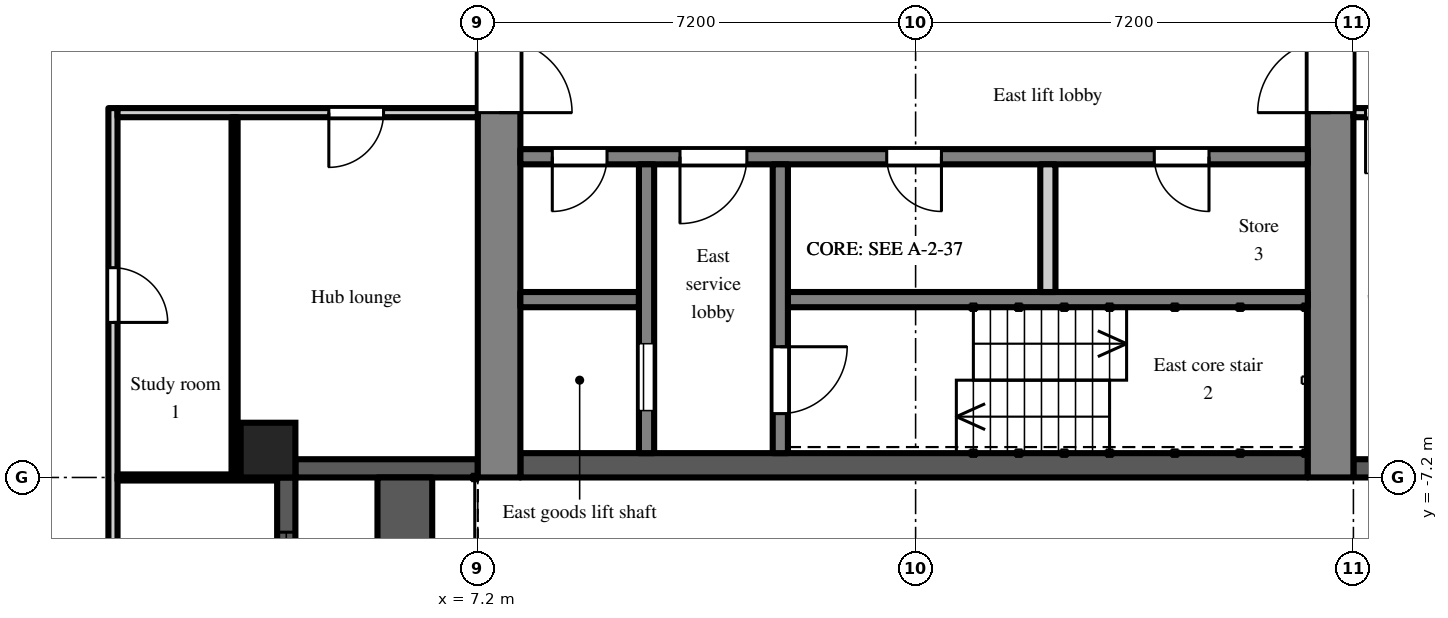
"""IFC4 building model, lengths in metres.
Left out: names, types, materials, properties, quantities, classifications, styles, units other than length and angle.
Written with IfcOpenShell. Run it as: python <this file> out.ifc"""

import sys

from ifc_helpers import new_model, si_unit, direction, frame, frame_2d, origin, origin_2d, place, context, subcontext, project, spatial, rectangle, extrude, element, fill, save


model = new_model("IFC4")
c1 = context("Model", 3, precision=1e-05, world=origin(), true_north=direction((0.0, 1.0)))
c2 = subcontext(c1, "Body", "Model", "MODEL_VIEW")
j1 = project(units=[si_unit("LENGTHUNIT", "METRE"), si_unit("PLANEANGLEUNIT", "RADIAN")], contexts=[c1])
p1 = place(None, origin())
s1 = spatial("IfcSite", under=j1, at=p1, CompositionType="ELEMENT")
p2 = place(p1, origin())
s2 = spatial("IfcBuilding", under=s1, at=p2, CompositionType="ELEMENT")
p3 = place(p2, frame((0.0, 0.0, 225.9)))
s3 = spatial("IfcBuildingStorey", under=s2, at=p3, CompositionType="ELEMENT", Elevation=225.9)
p4 = place(p3, frame((3.75, -6.75, 0.0), z_axis=(0.0, 0.0, 1.0), x_axis=(1.0, 0.0, 0.0)))
e1 = element("IfcColumn", 1, at=p4, inside=s3, PredefinedType="COLUMN", context=c2, shape_type="SweptSolid", body=[
    extrude(rectangle(XDim=0.9, YDim=0.9, at=origin_2d()), origin(), (0.0, 0.0, 1.0), 3.0),
])
p5 = place(p3, frame((21.6, -7.05, 0.0), z_axis=(0.0, 0.0, 1.0), x_axis=(1.0, 0.0, 0.0)))
e2 = element("IfcWall", 2, at=p5, inside=s3, PredefinedType="SOLIDWALL", context=c2, shape_type="SweptSolid", body=[
    extrude(rectangle(XDim=2.7, YDim=0.3, at=frame_2d((1.35, 0.0))), origin(), (0.0, 0.0, 1.0), 2.3),
])
p6 = place(p5, frame((0.75, 0.0, 0.2)))
e3 = element("IfcOpeningElement", 3, at=p6, cuts=e2, PredefinedType="OPENING", context=c2, shape_type="SweptSolid", body=[
    extrude(rectangle(XDim=1.2, YDim=1.85, at=frame_2d((0.6, 0.925))), frame((0.0, 0.16, 0.0), z_axis=(0.0, -1.0, 0.0), x_axis=(1.0, 0.0, 0.0)), (0.0, 0.0, 1.0), 0.32),
])
p7 = place(p3, frame((4.05, -14.4, 0.0), z_axis=(0.0, 0.0, 1.0), x_axis=(0.0, 1.0, 0.0)))
e4 = element("IfcWall", 4, at=p7, inside=s3, PredefinedType="SOLIDWALL", context=c2, shape_type="SweptSolid", body=[
    extrude(rectangle(XDim=7.2, YDim=0.3, at=frame_2d((3.6, 0.0))), origin(), (0.0, 0.0, 1.0), 2.3),
])
p8 = place(p7, frame((3.0, 0.0, 0.0)))
e5 = element("IfcOpeningElement", 5, at=p8, cuts=e4, PredefinedType="OPENING", context=c2, shape_type="SweptSolid", body=[
    extrude(rectangle(XDim=1.2, YDim=2.05, at=frame_2d((0.6, 1.025))), frame((0.0, 0.16, 0.0), z_axis=(0.0, -1.0, 0.0), x_axis=(1.0, 0.0, 0.0)), (0.0, 0.0, 1.0), 0.32),
])
p9 = place(p7, frame((0.9, 0.0, 0.2)))
e6 = element("IfcOpeningElement", 6, at=p9, cuts=e4, PredefinedType="OPENING", context=c2, shape_type="SweptSolid", body=[
    extrude(rectangle(XDim=1.8, YDim=1.85, at=frame_2d((0.9, 0.925))), frame((0.0, 0.16, 0.0), z_axis=(0.0, -1.0, 0.0), x_axis=(1.0, 0.0, 0.0)), (0.0, 0.0, 1.0), 0.32),
])
p10 = place(p7, frame((4.5, 0.0, 0.2)))
e7 = element("IfcOpeningElement", 7, at=p10, cuts=e4, PredefinedType="OPENING", context=c2, shape_type="SweptSolid", body=[
    extrude(rectangle(XDim=1.8, YDim=1.85, at=frame_2d((0.9, 0.925))), frame((0.0, 0.16, 0.0), z_axis=(0.0, -1.0, 0.0), x_axis=(1.0, 0.0, 0.0)), (0.0, 0.0, 1.0), 0.32),
])
p11 = place(p3, frame((4.2, -7.05, 0.0), z_axis=(0.0, 0.0, 1.0), x_axis=(1.0, 0.0, 0.0)))
e8 = element("IfcWall", 8, at=p11, inside=s3, PredefinedType="SOLIDWALL", context=c2, shape_type="SweptSolid", body=[
    extrude(rectangle(XDim=3.0, YDim=0.3, at=frame_2d((1.5, 0.0))), origin(), (0.0, 0.0, 1.0), 2.3),
])
p12 = place(p3, frame((6.0, -14.4, 0.0), z_axis=(0.0, 0.0, 1.0), x_axis=(0.0, 1.0, 0.0)))
e9 = element("IfcWall", 9, at=p12, inside=s3, PredefinedType="PARAPET", context=c2, shape_type="SweptSolid", body=[
    extrude(rectangle(XDim=7.2, YDim=0.9, at=frame_2d((3.6, 0.0))), origin(), (0.0, 0.0, 1.0), 0.8),
])
p13 = place(p3, frame((7.55, -7.2, 0.0), z_axis=(0.0, 0.0, 1.0), x_axis=(0.0, 1.0, 0.0)))
e10 = element("IfcWall", 10, at=p13, inside=s3, PredefinedType="SHEAR", context=c2, shape_type="SweptSolid", body=[
    extrude(rectangle(XDim=14.4, YDim=0.7, at=frame_2d((7.2, 0.0))), origin(), (0.0, 0.0, 1.0), 2.6),
])
p14 = place(p13, frame((6.0, 0.0, 0.0)))
e11 = element("IfcOpeningElement", 11, at=p14, cuts=e10, PredefinedType="OPENING", context=c2, shape_type="SweptSolid", body=[
    extrude(rectangle(XDim=2.4, YDim=2.2, at=frame_2d((1.2, 1.1))), frame((0.0, 0.36, 0.0), z_axis=(0.0, -1.0, 0.0), x_axis=(1.0, 0.0, 0.0)), (0.0, 0.0, 1.0), 0.72),
])
p15 = place(p3, frame((21.225, -7.2, 0.0), z_axis=(0.0, 0.0, 1.0), x_axis=(0.0, 1.0, 0.0)))
e12 = element("IfcWall", 12, at=p15, inside=s3, PredefinedType="SHEAR", context=c2, shape_type="SweptSolid", body=[
    extrude(rectangle(XDim=14.4, YDim=0.75, at=frame_2d((7.2, 0.0))), origin(), (0.0, 0.0, 1.0), 2.6),
])
p16 = place(p15, frame((6.0, 0.0, 0.0)))
e13 = element("IfcOpeningElement", 13, at=p16, cuts=e12, PredefinedType="OPENING", context=c2, shape_type="SweptSolid", body=[
    extrude(rectangle(XDim=2.4, YDim=2.2, at=frame_2d((1.2, 1.1))), frame((0.0, 0.385, 0.0), z_axis=(0.0, -1.0, 0.0), x_axis=(1.0, 0.0, 0.0)), (0.0, 0.0, 1.0), 0.77),
])
p17 = place(p3, frame((7.9, -7.0, 0.0), z_axis=(0.0, 0.0, 1.0), x_axis=(1.0, 0.0, 0.0)))
e14 = element("IfcWall", 14, at=p17, inside=s3, PredefinedType="SHEAR", context=c2, shape_type="SweptSolid", body=[
    extrude(rectangle(XDim=12.95, YDim=0.4, at=frame_2d((6.475, 0.0))), origin(), (0.0, 0.0, 1.0), 2.6),
])
p18 = place(p3, frame((7.9, -1.925, 0.0), z_axis=(0.0, 0.0, 1.0), x_axis=(1.0, 0.0, 0.0)))
e15 = element("IfcWall", 15, at=p18, inside=s3, PredefinedType="SHEAR", context=c2, shape_type="SweptSolid", body=[
    extrude(rectangle(XDim=12.95, YDim=0.25, at=frame_2d((6.475, 0.0))), origin(), (0.0, 0.0, 1.0), 2.6),
])
p19 = place(p18, frame((0.525, 0.0, 0.0)))
e16 = element("IfcOpeningElement", 16, at=p19, cuts=e15, PredefinedType="OPENING", context=c2, shape_type="SweptSolid", body=[
    extrude(rectangle(XDim=0.9, YDim=2.1, at=frame_2d((0.45, 1.05))), frame((0.0, 0.135, 0.0), z_axis=(0.0, -1.0, 0.0), x_axis=(1.0, 0.0, 0.0)), (0.0, 0.0, 1.0), 0.27),
])
p20 = place(p18, frame((2.625, 0.0, 0.0)))
e17 = element("IfcOpeningElement", 17, at=p20, cuts=e15, PredefinedType="OPENING", context=c2, shape_type="SweptSolid", body=[
    extrude(rectangle(XDim=1.1, YDim=2.1, at=frame_2d((0.55, 1.05))), frame((0.0, 0.135, 0.0), z_axis=(0.0, -1.0, 0.0), x_axis=(1.0, 0.0, 0.0)), (0.0, 0.0, 1.0), 0.27),
])
p21 = place(p18, frame((6.025, 0.0, 0.0)))
e18 = element("IfcOpeningElement", 18, at=p21, cuts=e15, PredefinedType="OPENING", context=c2, shape_type="SweptSolid", body=[
    extrude(rectangle(XDim=0.9, YDim=2.1, at=frame_2d((0.45, 1.05))), frame((0.0, 0.135, 0.0), z_axis=(0.0, -1.0, 0.0), x_axis=(1.0, 0.0, 0.0)), (0.0, 0.0, 1.0), 0.27),
])
p22 = place(p18, frame((10.425, 0.0, 0.0)))
e19 = element("IfcOpeningElement", 19, at=p22, cuts=e15, PredefinedType="OPENING", context=c2, shape_type="SweptSolid", body=[
    extrude(rectangle(XDim=0.9, YDim=2.1, at=frame_2d((0.45, 1.05))), frame((0.0, 0.135, 0.0), z_axis=(0.0, -1.0, 0.0), x_axis=(1.0, 0.0, 0.0)), (0.0, 0.0, 1.0), 0.27),
])
p23 = place(p3, frame((7.9, -4.275, 0.0), z_axis=(0.0, 0.0, 1.0), x_axis=(1.0, 0.0, 0.0)))
e20 = element("IfcWall", 20, at=p23, inside=s3, PredefinedType="SHEAR", context=c2, shape_type="SweptSolid", body=[
    extrude(rectangle(XDim=1.95, YDim=0.25, at=frame_2d((0.975, 0.0))), origin(), (0.0, 0.0, 1.0), 2.6),
])
p24 = place(p3, frame((12.3, -4.275, 0.0), z_axis=(0.0, 0.0, 1.0), x_axis=(1.0, 0.0, 0.0)))
e21 = element("IfcWall", 21, at=p24, inside=s3, PredefinedType="SHEAR", context=c2, shape_type="SweptSolid", body=[
    extrude(rectangle(XDim=8.55, YDim=0.25, at=frame_2d((4.275, 0.0))), origin(), (0.0, 0.0, 1.0), 2.6),
])
p25 = place(p3, frame((9.975, -2.05, 0.0), z_axis=(0.0, 0.0, 1.0), x_axis=(0.0, -1.0, 0.0)))
e22 = element("IfcWall", 22, at=p25, inside=s3, PredefinedType="SHEAR", context=c2, shape_type="SweptSolid", body=[
    extrude(rectangle(XDim=4.75, YDim=0.25, at=frame_2d((2.375, 0.0))), origin(), (0.0, 0.0, 1.0), 2.6),
])
p26 = place(p25, frame((2.95, 0.0, 0.0)))
e23 = element("IfcOpeningElement", 23, at=p26, cuts=e22, PredefinedType="OPENING", context=c2, shape_type="SweptSolid", body=[
    extrude(rectangle(XDim=1.1, YDim=2.1, at=frame_2d((0.55, 1.05))), frame((0.0, 0.135, 0.0), z_axis=(0.0, -1.0, 0.0), x_axis=(1.0, 0.0, 0.0)), (0.0, 0.0, 1.0), 0.27),
])
p27 = place(p3, frame((12.175, -2.05, 0.0), z_axis=(0.0, 0.0, 1.0), x_axis=(0.0, -1.0, 0.0)))
e24 = element("IfcWall", 24, at=p27, inside=s3, PredefinedType="SHEAR", context=c2, shape_type="SweptSolid", body=[
    extrude(rectangle(XDim=4.75, YDim=0.25, at=frame_2d((2.375, 0.0))), origin(), (0.0, 0.0, 1.0), 2.6),
])
p28 = place(p27, frame((3.0, 0.0, 0.0)))
e25 = element("IfcOpeningElement", 25, at=p28, cuts=e24, PredefinedType="OPENING", context=c2, shape_type="SweptSolid", body=[
    extrude(rectangle(XDim=1.1, YDim=2.1, at=frame_2d((0.55, 1.05))), frame((0.0, 0.135, 0.0), z_axis=(0.0, -1.0, 0.0), x_axis=(1.0, 0.0, 0.0)), (0.0, 0.0, 1.0), 0.27),
])
p29 = place(p3, frame((16.575, -2.05, 0.0), z_axis=(0.0, 0.0, 1.0), x_axis=(0.0, -1.0, 0.0)))
e26 = element("IfcWall", 26, at=p29, inside=s3, PredefinedType="PARTITIONING", context=c2, shape_type="SweptSolid", body=[
    extrude(rectangle(XDim=2.1, YDim=0.25, at=frame_2d((1.05, 0.0))), origin(), (0.0, 0.0, 1.0), 2.6),
])
p30 = place(p3, frame((1.2, -19.525, 0.0), z_axis=(0.0, 0.0, 1.0), x_axis=(0.0, 1.0, 0.0)))
e27 = element("IfcWall", 27, at=p30, inside=s3, PredefinedType="PARTITIONING", context=c2, shape_type="SweptSolid", body=[
    extrude(rectangle(XDim=18.4, YDim=0.15, at=frame_2d((9.2, 0.0))), origin(), (0.0, 0.0, 1.0), 2.6),
])
p31 = place(p30, frame((14.875, 0.0, 0.0)))
e28 = element("IfcOpeningElement", 28, at=p31, cuts=e27, PredefinedType="OPENING", context=c2, shape_type="SweptSolid", body=[
    extrude(rectangle(XDim=0.9, YDim=2.1, at=frame_2d((0.45, 1.05))), frame((0.0, 0.085, 0.0), z_axis=(0.0, -1.0, 0.0), x_axis=(1.0, 0.0, 0.0)), (0.0, 0.0, 1.0), 0.17),
])
p32 = place(p30, frame((6.475, 0.0, 0.0)))
e29 = element("IfcOpeningElement", 29, at=p32, cuts=e27, PredefinedType="OPENING", context=c2, shape_type="SweptSolid", body=[
    extrude(rectangle(XDim=0.9, YDim=2.1, at=frame_2d((0.45, 1.05))), frame((0.0, 0.085, 0.0), z_axis=(0.0, -1.0, 0.0), x_axis=(1.0, 0.0, 0.0)), (0.0, 0.0, 1.0), 0.17),
])
p33 = place(p30, frame((3.525, 0.0, 0.0)))
e30 = element("IfcOpeningElement", 30, at=p33, cuts=e27, PredefinedType="OPENING", context=c2, shape_type="SweptSolid", body=[
    extrude(rectangle(XDim=1.0, YDim=2.1, at=frame_2d((0.5, 1.05))), frame((0.0, 0.085, 0.0), z_axis=(0.0, -1.0, 0.0), x_axis=(1.0, 0.0, 0.0)), (0.0, 0.0, 1.0), 0.17),
])
p34 = place(p30, frame((0.275, 0.0, 0.0)))
e31 = element("IfcOpeningElement", 31, at=p34, cuts=e27, PredefinedType="OPENING", context=c2, shape_type="SweptSolid", body=[
    extrude(rectangle(XDim=0.9, YDim=2.1, at=frame_2d((0.45, 1.05))), frame((0.0, 0.085, 0.0), z_axis=(0.0, -1.0, 0.0), x_axis=(1.0, 0.0, 0.0)), (0.0, 0.0, 1.0), 0.17),
])
p35 = place(p3, frame((1.275, -7.2, 0.0), z_axis=(0.0, 0.0, 1.0), x_axis=(1.0, 0.0, 0.0)))
e32 = element("IfcWall", 32, at=p35, inside=s3, PredefinedType="PARTITIONING", context=c2, shape_type="SweptSolid", body=[
    extrude(rectangle(XDim=2.625, YDim=0.1, at=frame_2d((1.312, 0.0))), origin(), (0.0, 0.0, 1.0), 2.6),
])
p36 = place(p3, frame((1.275, -1.2, 0.0), z_axis=(0.0, 0.0, 1.0), x_axis=(1.0, 0.0, 0.0)))
e33 = element("IfcWall", 33, at=p36, inside=s3, PredefinedType="PARTITIONING", context=c2, shape_type="SweptSolid", body=[
    extrude(rectangle(XDim=5.925, YDim=0.15, at=frame_2d((2.962, 0.0))), origin(), (0.0, 0.0, 1.0), 2.6),
])
p37 = place(p36, frame((3.475, 0.0, 0.0)))
e34 = element("IfcOpeningElement", 34, at=p37, cuts=e33, PredefinedType="OPENING", context=c2, shape_type="SweptSolid", body=[
    extrude(rectangle(XDim=0.9, YDim=2.1, at=frame_2d((0.45, 1.05))), frame((0.0, 0.085, 0.0), z_axis=(0.0, -1.0, 0.0), x_axis=(1.0, 0.0, 0.0)), (0.0, 0.0, 1.0), 0.17),
])
p38 = place(p3, frame((3.2, -7.15, 0.0), z_axis=(0.0, 0.0, 1.0), x_axis=(0.0, 1.0, 0.0)))
e35 = element("IfcWall", 35, at=p38, inside=s3, PredefinedType="PARTITIONING", context=c2, shape_type="SweptSolid", body=[
    extrude(rectangle(XDim=5.875, YDim=0.1, at=frame_2d((2.938, 0.0))), origin(), (0.0, 0.0, 1.0), 2.6),
])
p39 = place(p3, frame((21.6, -1.2, 0.0), z_axis=(0.0, 0.0, 1.0), x_axis=(1.0, 0.0, 0.0)))
e36 = element("IfcWall", 36, at=p39, inside=s3, PredefinedType="PARTITIONING", context=c2, shape_type="SweptSolid", body=[
    extrude(rectangle(XDim=5.125, YDim=0.15, at=frame_2d((2.562, 0.0))), origin(), (0.0, 0.0, 1.0), 2.6),
])
p40 = place(p39, frame((0.2, 0.0, 0.0)))
e37 = element("IfcOpeningElement", 37, at=p40, cuts=e36, PredefinedType="OPENING", context=c2, shape_type="SweptSolid", body=[
    extrude(rectangle(XDim=1.0, YDim=2.1, at=frame_2d((0.5, 1.05))), frame((0.0, 0.085, 0.0), z_axis=(0.0, -1.0, 0.0), x_axis=(1.0, 0.0, 0.0)), (0.0, 0.0, 1.0), 0.17),
])
p41 = place(p10, origin())
e38 = element("IfcWindow", 38, at=p41, inside=s3, PartitioningType="SINGLE_PANEL", PredefinedType="WINDOW", context=c2, shape_type="SweptSolid", body=[
    extrude(rectangle(XDim=1.8, YDim=1.85, at=frame_2d((0.9, 0.925))), frame((0.0, 0.03, 0.0), z_axis=(0.0, -1.0, 0.0), x_axis=(1.0, 0.0, 0.0)), (0.0, 0.0, 1.0), 0.06),
])
fill(e7, e38)
p42 = place(p26, origin())
e39 = element("IfcDoor", 39, at=p42, inside=s3, OperationType="SLIDING_TO_LEFT", PredefinedType="DOOR", context=c2, shape_type="SweptSolid", body=[
    extrude(rectangle(XDim=1.1, YDim=2.1, at=frame_2d((0.55, 1.05))), frame((0.0, 0.025, 0.0), z_axis=(0.0, -1.0, 0.0), x_axis=(1.0, 0.0, 0.0)), (0.0, 0.0, 1.0), 0.05),
])
fill(e23, e39)
p43 = place(p28, origin())
e40 = element("IfcDoor", 40, at=p43, inside=s3, OperationType="SINGLE_SWING_LEFT", PredefinedType="DOOR", context=c2, shape_type="SweptSolid", body=[
    extrude(rectangle(XDim=1.1, YDim=2.1, at=frame_2d((0.55, 1.05))), frame((0.0, 0.025, 0.0), z_axis=(0.0, -1.0, 0.0), x_axis=(1.0, 0.0, 0.0)), (0.0, 0.0, 1.0), 0.05),
])
fill(e25, e40)
p44 = place(p19, frame((0.9, 0.0, 0.0), z_axis=(0.0, 0.0, 1.0), x_axis=(-1.0, 0.0, 0.0)))
e41 = element("IfcDoor", 41, at=p44, inside=s3, OperationType="SINGLE_SWING_RIGHT", PredefinedType="DOOR", context=c2, shape_type="SweptSolid", body=[
    extrude(rectangle(XDim=0.9, YDim=2.1, at=frame_2d((0.45, 1.05))), frame((0.0, 0.025, 0.0), z_axis=(0.0, -1.0, 0.0), x_axis=(1.0, 0.0, 0.0)), (0.0, 0.0, 1.0), 0.05),
])
fill(e16, e41)
p45 = place(p20, frame((1.1, 0.0, 0.0), z_axis=(0.0, 0.0, 1.0), x_axis=(-1.0, 0.0, 0.0)))
e42 = element("IfcDoor", 42, at=p45, inside=s3, OperationType="SINGLE_SWING_RIGHT", PredefinedType="DOOR", context=c2, shape_type="SweptSolid", body=[
    extrude(rectangle(XDim=1.1, YDim=2.1, at=frame_2d((0.55, 1.05))), frame((0.0, 0.025, 0.0), z_axis=(0.0, -1.0, 0.0), x_axis=(1.0, 0.0, 0.0)), (0.0, 0.0, 1.0), 0.05),
])
fill(e17, e42)
p46 = place(p14, frame((2.4, 0.0, 0.0), z_axis=(0.0, 0.0, 1.0), x_axis=(-1.0, 0.0, 0.0)))
e43 = element("IfcDoor", 43, at=p46, inside=s3, OperationType="DOUBLE_DOOR_DOUBLE_SWING", PredefinedType="DOOR", context=c2, shape_type="SweptSolid", body=[
    extrude(rectangle(XDim=2.4, YDim=2.2, at=frame_2d((1.2, 1.1))), frame((0.0, 0.025, 0.0), z_axis=(0.0, -1.0, 0.0), x_axis=(1.0, 0.0, 0.0)), (0.0, 0.0, 1.0), 0.05),
])
fill(e11, e43)
p47 = place(p16, origin())
e44 = element("IfcDoor", 44, at=p47, inside=s3, OperationType="DOUBLE_DOOR_DOUBLE_SWING", PredefinedType="DOOR", context=c2, shape_type="SweptSolid", body=[
    extrude(rectangle(XDim=2.4, YDim=2.2, at=frame_2d((1.2, 1.1))), frame((0.0, 0.025, 0.0), z_axis=(0.0, -1.0, 0.0), x_axis=(1.0, 0.0, 0.0)), (0.0, 0.0, 1.0), 0.05),
])
fill(e13, e44)
p48 = place(p21, frame((0.9, 0.0, 0.0), z_axis=(0.0, 0.0, 1.0), x_axis=(-1.0, 0.0, 0.0)))
e45 = element("IfcDoor", 45, at=p48, inside=s3, OperationType="SINGLE_SWING_LEFT", PredefinedType="DOOR", context=c2, shape_type="SweptSolid", body=[
    extrude(rectangle(XDim=0.9, YDim=2.1, at=frame_2d((0.45, 1.05))), frame((0.0, 0.025, 0.0), z_axis=(0.0, -1.0, 0.0), x_axis=(1.0, 0.0, 0.0)), (0.0, 0.0, 1.0), 0.05),
])
fill(e18, e45)
p49 = place(p22, frame((0.9, 0.0, 0.0), z_axis=(0.0, 0.0, 1.0), x_axis=(-1.0, 0.0, 0.0)))
e46 = element("IfcDoor", 46, at=p49, inside=s3, OperationType="SINGLE_SWING_LEFT", PredefinedType="DOOR", context=c2, shape_type="SweptSolid", body=[
    extrude(rectangle(XDim=0.9, YDim=2.1, at=frame_2d((0.45, 1.05))), frame((0.0, 0.025, 0.0), z_axis=(0.0, -1.0, 0.0), x_axis=(1.0, 0.0, 0.0)), (0.0, 0.0, 1.0), 0.05),
])
fill(e19, e46)
p50 = place(p31, frame((0.9, 0.0, 0.0), z_axis=(0.0, 0.0, 1.0), x_axis=(-1.0, 0.0, 0.0)))
e47 = element("IfcDoor", 47, at=p50, inside=s3, OperationType="SINGLE_SWING_RIGHT", PredefinedType="DOOR", context=c2, shape_type="SweptSolid", body=[
    extrude(rectangle(XDim=0.9, YDim=2.1, at=frame_2d((0.45, 1.05))), frame((0.0, 0.025, 0.0), z_axis=(0.0, -1.0, 0.0), x_axis=(1.0, 0.0, 0.0)), (0.0, 0.0, 1.0), 0.05),
])
fill(e28, e47)
p51 = place(p37, frame((0.9, 0.0, 0.0), z_axis=(0.0, 0.0, 1.0), x_axis=(-1.0, 0.0, 0.0)))
e48 = element("IfcDoor", 48, at=p51, inside=s3, OperationType="SINGLE_SWING_RIGHT", PredefinedType="DOOR", context=c2, shape_type="SweptSolid", body=[
    extrude(rectangle(XDim=0.9, YDim=2.1, at=frame_2d((0.45, 1.05))), frame((0.0, 0.025, 0.0), z_axis=(0.0, -1.0, 0.0), x_axis=(1.0, 0.0, 0.0)), (0.0, 0.0, 1.0), 0.05),
])
fill(e34, e48)
p52 = place(p40, frame((1.0, 0.0, 0.0), z_axis=(0.0, 0.0, 1.0), x_axis=(-1.0, 0.0, 0.0)))
e49 = element("IfcDoor", 49, at=p52, inside=s3, OperationType="SINGLE_SWING_RIGHT", PredefinedType="DOOR", context=c2, shape_type="SweptSolid", body=[
    extrude(rectangle(XDim=1.0, YDim=2.1, at=frame_2d((0.5, 1.05))), frame((0.0, 0.025, 0.0), z_axis=(0.0, -1.0, 0.0), x_axis=(1.0, 0.0, 0.0)), (0.0, 0.0, 1.0), 0.05),
])
fill(e37, e49)
save(model, sys.argv[1])
